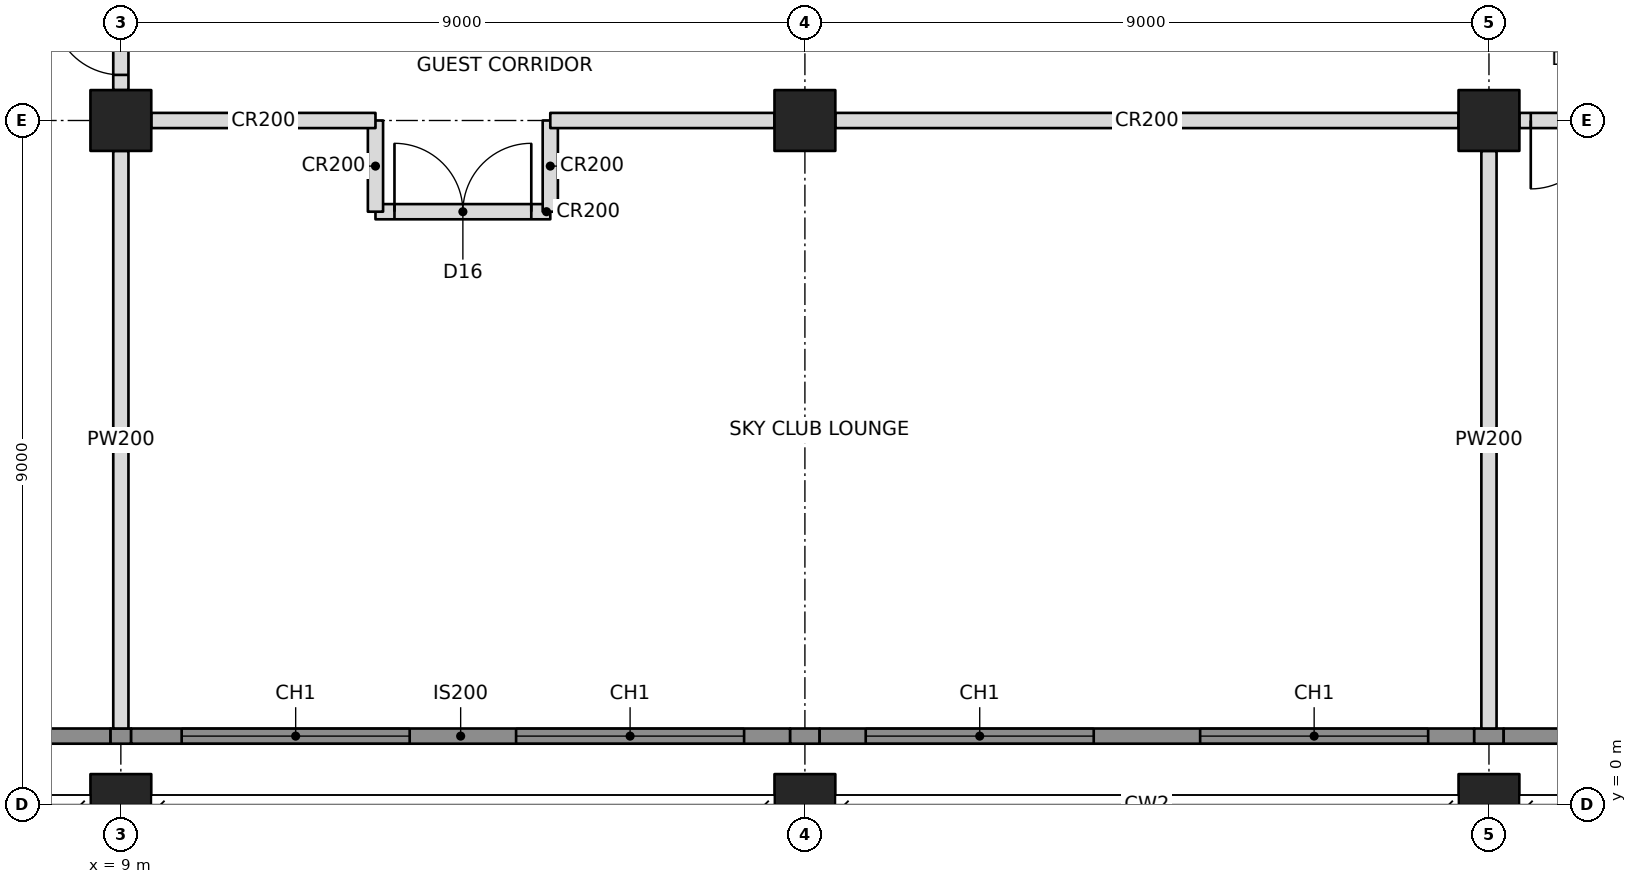
"""IFC4 building model, lengths in metres.
Left out: names, types, materials, properties, quantities, classifications, styles, units other than length and angle.
Written with IfcOpenShell. Run it as: python <this file> out.ifc"""

import sys

from ifc_helpers import new_model, si_unit, direction, frame, frame_2d, origin, origin_2d, place, context, subcontext, project, spatial, rectangle, hollow_rectangle, extrude, element, fill, save


model = new_model("IFC4")
c1 = context("Model", 3, precision=1e-05, world=origin(), true_north=direction((0.0, 1.0)))
c2 = subcontext(c1, "Body", "Model", "MODEL_VIEW")
j1 = project(units=[si_unit("LENGTHUNIT", "METRE"), si_unit("PLANEANGLEUNIT", "RADIAN")], contexts=[c1])
p1 = place(None, origin())
s1 = spatial("IfcSite", under=j1, at=p1, CompositionType="ELEMENT")
p2 = place(p1, origin())
s2 = spatial("IfcBuilding", under=s1, at=p2, CompositionType="ELEMENT")
p3 = place(p2, frame((0.0, 0.0, 226.6)))
s3 = spatial("IfcBuildingStorey", under=s2, at=p3, CompositionType="ELEMENT", Elevation=226.6)
p4 = place(p3, frame((9.0, 0.0, 0.0), z_axis=(0.0, 0.0, 1.0), x_axis=(1.0, 0.0, 0.0)))
e1 = element("IfcColumn", 1, at=p4, inside=s3, PredefinedType="COLUMN", context=c2, shape_type="SweptSolid", body=[
    extrude(hollow_rectangle(XDim=0.8, YDim=0.8, WallThickness=0.05, at=origin_2d()), origin(), (0.0, 0.0, 1.0), 3.6),
])
p5 = place(p3, frame((9.0, 9.0, 0.0), z_axis=(0.0, 0.0, 1.0), x_axis=(1.0, 0.0, 0.0)))
e2 = element("IfcColumn", 2, at=p5, inside=s3, PredefinedType="COLUMN", context=c2, shape_type="SweptSolid", body=[
    extrude(hollow_rectangle(XDim=0.8, YDim=0.8, WallThickness=0.1, at=origin_2d()), origin(), (0.0, 0.0, 1.0), 3.6),
])
p6 = place(p3, frame((18.0, 0.0, 0.0), z_axis=(0.0, 0.0, 1.0), x_axis=(1.0, 0.0, 0.0)))
e3 = element("IfcColumn", 3, at=p6, inside=s3, PredefinedType="COLUMN", context=c2, shape_type="SweptSolid", body=[
    extrude(hollow_rectangle(XDim=0.8, YDim=0.8, WallThickness=0.05, at=origin_2d()), origin(), (0.0, 0.0, 1.0), 3.6),
])
p7 = place(p3, frame((18.0, 9.0, 0.0), z_axis=(0.0, 0.0, 1.0), x_axis=(1.0, 0.0, 0.0)))
e4 = element("IfcColumn", 4, at=p7, inside=s3, PredefinedType="COLUMN", context=c2, shape_type="SweptSolid", body=[
    extrude(hollow_rectangle(XDim=0.8, YDim=0.8, WallThickness=0.1, at=origin_2d()), origin(), (0.0, 0.0, 1.0), 3.6),
])
p8 = place(p3, frame((27.0, 0.0, 0.0), z_axis=(0.0, 0.0, 1.0), x_axis=(1.0, 0.0, 0.0)))
e5 = element("IfcColumn", 5, at=p8, inside=s3, PredefinedType="COLUMN", context=c2, shape_type="SweptSolid", body=[
    extrude(hollow_rectangle(XDim=0.8, YDim=0.8, WallThickness=0.05, at=origin_2d()), origin(), (0.0, 0.0, 1.0), 3.6),
])
p9 = place(p3, frame((27.0, 9.0, 0.0), z_axis=(0.0, 0.0, 1.0), x_axis=(1.0, 0.0, 0.0)))
e6 = element("IfcColumn", 6, at=p9, inside=s3, PredefinedType="COLUMN", context=c2, shape_type="SweptSolid", body=[
    extrude(hollow_rectangle(XDim=0.8, YDim=0.8, WallThickness=0.1, at=origin_2d()), origin(), (0.0, 0.0, 1.0), 3.6),
])
p10 = place(p3, frame((3.0, 0.9, 0.0), z_axis=(0.0, 0.0, 1.0), x_axis=(1.0, 0.0, 0.0)))
e7 = element("IfcWall", 7, at=p10, inside=s3, PredefinedType="SOLIDWALL", context=c2, shape_type="SweptSolid", body=[
    extrude(rectangle(XDim=5.865, YDim=0.2, at=frame_2d((2.932, 0.0))), origin(), (0.0, 0.0, 1.0), 3.4),
])
p11 = place(p10, frame((1.45, 0.0, 0.6)))
e8 = element("IfcOpeningElement", 8, at=p11, cuts=e7, PredefinedType="OPENING", context=c2, shape_type="SweptSolid", body=[
    extrude(rectangle(XDim=3.0, YDim=2.2, at=frame_2d((1.5, 1.1))), frame((0.0, 0.11, 0.0), z_axis=(0.0, -1.0, 0.0), x_axis=(1.0, 0.0, 0.0)), (0.0, 0.0, 1.0), 0.22),
])
p12 = place(p3, frame((9.4, 9.0, 0.0), z_axis=(0.0, 0.0, 1.0), x_axis=(1.0, 0.0, 0.0)))
e9 = element("IfcWall", 9, at=p12, inside=s3, PredefinedType="PARTITIONING", context=c2, shape_type="SweptSolid", body=[
    extrude(rectangle(XDim=2.95, YDim=0.2, at=frame_2d((1.475, 0.0))), origin(), (0.0, 0.0, 1.0), 2.605),
])
p13 = place(p3, frame((18.4, 9.0, 0.0), z_axis=(0.0, 0.0, 1.0), x_axis=(1.0, 0.0, 0.0)))
e10 = element("IfcWall", 10, at=p13, inside=s3, PredefinedType="PARTITIONING", context=c2, shape_type="SweptSolid", body=[
    extrude(rectangle(XDim=8.2, YDim=0.2, at=frame_2d((4.1, 0.0))), origin(), (0.0, 0.0, 1.0), 2.605),
])
p14 = place(p3, frame((27.4, 9.0, 0.0), z_axis=(0.0, 0.0, 1.0), x_axis=(1.0, 0.0, 0.0)))
e11 = element("IfcWall", 11, at=p14, inside=s3, PredefinedType="PARTITIONING", context=c2, shape_type="SweptSolid", body=[
    extrude(rectangle(XDim=8.368, YDim=0.2, at=frame_2d((4.184, 0.0))), origin(), (0.0, 0.0, 1.0), 2.605),
])
p15 = place(p14, frame((6.825, 0.0, 0.0)))
e12 = element("IfcOpeningElement", 12, at=p15, cuts=e11, PredefinedType="OPENING", context=c2, shape_type="SweptSolid", body=[
    extrude(rectangle(XDim=1.0, YDim=2.1, at=frame_2d((0.5, 1.05))), frame((0.0, 0.11, 0.0), z_axis=(0.0, -1.0, 0.0), x_axis=(1.0, 0.0, 0.0)), (0.0, 0.0, 1.0), 0.22),
])
p16 = place(p14, frame((0.15, 0.0, 0.0)))
e13 = element("IfcOpeningElement", 13, at=p16, cuts=e11, PredefinedType="OPENING", context=c2, shape_type="SweptSolid", body=[
    extrude(rectangle(XDim=0.9, YDim=2.1, at=frame_2d((0.45, 1.05))), frame((0.0, 0.11, 0.0), z_axis=(0.0, -1.0, 0.0), x_axis=(1.0, 0.0, 0.0)), (0.0, 0.0, 1.0), 0.22),
])
p17 = place(p3, frame((9.0, 8.6, 0.0), z_axis=(0.0, 0.0, 1.0), x_axis=(0.0, -1.0, 0.0)))
e14 = element("IfcWall", 14, at=p17, inside=s3, PredefinedType="PARTITIONING", context=c2, shape_type="SweptSolid", body=[
    extrude(rectangle(XDim=7.6, YDim=0.2, at=frame_2d((3.8, 0.0))), origin(), (0.0, 0.0, 1.0), 2.638),
])
p18 = place(p3, frame((27.0, 8.6, 0.0), z_axis=(0.0, 0.0, 1.0), x_axis=(0.0, -1.0, 0.0)))
e15 = element("IfcWall", 15, at=p18, inside=s3, PredefinedType="PARTITIONING", context=c2, shape_type="SweptSolid", body=[
    extrude(rectangle(XDim=7.6, YDim=0.2, at=frame_2d((3.8, 0.0))), origin(), (0.0, 0.0, 1.0), 2.605),
])
p19 = place(p3, frame((14.65, 9.0, 0.0), z_axis=(0.0, 0.0, 1.0), x_axis=(1.0, 0.0, 0.0)))
e16 = element("IfcWall", 16, at=p19, inside=s3, PredefinedType="PARTITIONING", context=c2, shape_type="SweptSolid", body=[
    extrude(rectangle(XDim=2.95, YDim=0.2, at=frame_2d((1.475, 0.0))), origin(), (0.0, 0.0, 1.0), 2.605),
])
for number, where, z_axis, x_axis in (
    (17, (12.35, 9.0, 0.0), (0.0, 0.0, 1.0), (0.0, -1.0, 0.0)),
    (18, (14.65, 9.0, 0.0), (0.0, 0.0, 1.0), (0.0, -1.0, 0.0)),
):
    element("IfcWall", number, at=place(p3, frame(where, z_axis=z_axis, x_axis=x_axis)), inside=s3, PredefinedType="PARTITIONING", context=c2, shape_type="SweptSolid", body=[
        extrude(rectangle(XDim=1.2, YDim=0.2, at=frame_2d((0.6, 0.0))), origin(), (0.0, 0.0, 1.0), 2.604),
    ])
p20 = place(p3, frame((12.35, 7.8, 0.0), z_axis=(0.0, 0.0, 1.0), x_axis=(1.0, 0.0, 0.0)))
e19 = element("IfcWall", 19, at=p20, inside=s3, PredefinedType="PARTITIONING", context=c2, shape_type="SweptSolid", body=[
    extrude(rectangle(XDim=2.3, YDim=0.2, at=frame_2d((1.15, 0.0))), origin(), (0.0, 0.0, 1.0), 3.4),
])
p21 = place(p20, frame((0.25, 0.0, 0.0)))
e20 = element("IfcOpeningElement", 20, at=p21, cuts=e19, PredefinedType="OPENING", context=c2, shape_type="SweptSolid", body=[
    extrude(rectangle(XDim=1.8, YDim=2.4, at=frame_2d((0.9, 1.2))), frame((0.0, 0.11, 0.0), z_axis=(0.0, -1.0, 0.0), x_axis=(1.0, 0.0, 0.0)), (0.0, 0.0, 1.0), 0.22),
])
p22 = place(p3, frame((9.0, 9.4, 0.0), z_axis=(0.0, 0.0, 1.0), x_axis=(0.0, 1.0, 0.0)))
e21 = element("IfcWall", 21, at=p22, inside=s3, PredefinedType="PARTITIONING", context=c2, shape_type="SweptSolid", body=[
    extrude(rectangle(XDim=1.3, YDim=0.2, at=frame_2d((0.65, 0.0))), origin(), (0.0, 0.0, 1.0), 2.605),
])
p23 = place(p22, frame((0.2, 0.0, 0.0)))
e22 = element("IfcOpeningElement", 22, at=p23, cuts=e21, PredefinedType="OPENING", context=c2, shape_type="SweptSolid", body=[
    extrude(rectangle(XDim=0.9, YDim=2.1, at=frame_2d((0.45, 1.05))), frame((0.0, 0.11, 0.0), z_axis=(0.0, -1.0, 0.0), x_axis=(1.0, 0.0, 0.0)), (0.0, 0.0, 1.0), 0.22),
])
p24 = place(p3, frame((8.865, 0.9, 0.0), z_axis=(0.0, 0.0, 1.0), x_axis=(1.0, 0.0, 0.0)))
e23 = element("IfcWall", 23, at=p24, inside=s3, PredefinedType="SOLIDWALL", context=c2, shape_type="SweptSolid", body=[
    extrude(rectangle(XDim=0.271, YDim=0.2, at=frame_2d((0.135, 0.0))), origin(), (0.0, 0.0, 1.0), 2.638),
])
p25 = place(p3, frame((9.135, 0.9, 0.0), z_axis=(0.0, 0.0, 1.0), x_axis=(1.0, 0.0, 0.0)))
e24 = element("IfcWall", 24, at=p25, inside=s3, PredefinedType="SOLIDWALL", context=c2, shape_type="SweptSolid", body=[
    extrude(rectangle(XDim=8.671, YDim=0.2, at=frame_2d((4.335, 0.0))), origin(), (0.0, 0.0, 1.0), 3.4),
])
p26 = place(p25, frame((0.665, 0.0, 0.6)))
e25 = element("IfcOpeningElement", 25, at=p26, cuts=e24, PredefinedType="OPENING", context=c2, shape_type="SweptSolid", body=[
    extrude(rectangle(XDim=3.0, YDim=2.2, at=frame_2d((1.5, 1.1))), frame((0.0, 0.11, 0.0), z_axis=(0.0, -1.0, 0.0), x_axis=(1.0, 0.0, 0.0)), (0.0, 0.0, 1.0), 0.22),
])
p27 = place(p25, frame((5.065, 0.0, 0.6)))
e26 = element("IfcOpeningElement", 26, at=p27, cuts=e24, PredefinedType="OPENING", context=c2, shape_type="SweptSolid", body=[
    extrude(rectangle(XDim=3.0, YDim=2.2, at=frame_2d((1.5, 1.1))), frame((0.0, 0.11, 0.0), z_axis=(0.0, -1.0, 0.0), x_axis=(1.0, 0.0, 0.0)), (0.0, 0.0, 1.0), 0.22),
])
p28 = place(p3, frame((17.806, 0.9, 0.0), z_axis=(0.0, 0.0, 1.0), x_axis=(1.0, 0.0, 0.0)))
e27 = element("IfcWall", 27, at=p28, inside=s3, PredefinedType="SOLIDWALL", context=c2, shape_type="SweptSolid", body=[
    extrude(rectangle(XDim=0.388, YDim=0.2, at=frame_2d((0.194, 0.0))), origin(), (0.0, 0.0, 1.0), 2.604),
])
p29 = place(p3, frame((18.194, 0.9, 0.0), z_axis=(0.0, 0.0, 1.0), x_axis=(1.0, 0.0, 0.0)))
e28 = element("IfcWall", 28, at=p29, inside=s3, PredefinedType="SOLIDWALL", context=c2, shape_type="SweptSolid", body=[
    extrude(rectangle(XDim=8.612, YDim=0.2, at=frame_2d((4.306, 0.0))), origin(), (0.0, 0.0, 1.0), 3.4),
])
p30 = place(p29, frame((0.606, 0.0, 0.6)))
e29 = element("IfcOpeningElement", 29, at=p30, cuts=e28, PredefinedType="OPENING", context=c2, shape_type="SweptSolid", body=[
    extrude(rectangle(XDim=3.0, YDim=2.2, at=frame_2d((1.5, 1.1))), frame((0.0, 0.11, 0.0), z_axis=(0.0, -1.0, 0.0), x_axis=(1.0, 0.0, 0.0)), (0.0, 0.0, 1.0), 0.22),
])
p31 = place(p29, frame((5.006, 0.0, 0.6)))
e30 = element("IfcOpeningElement", 30, at=p31, cuts=e28, PredefinedType="OPENING", context=c2, shape_type="SweptSolid", body=[
    extrude(rectangle(XDim=3.0, YDim=2.2, at=frame_2d((1.5, 1.1))), frame((0.0, 0.11, 0.0), z_axis=(0.0, -1.0, 0.0), x_axis=(1.0, 0.0, 0.0)), (0.0, 0.0, 1.0), 0.22),
])
p32 = place(p3, frame((26.806, 0.9, 0.0), z_axis=(0.0, 0.0, 1.0), x_axis=(1.0, 0.0, 0.0)))
e31 = element("IfcWall", 31, at=p32, inside=s3, PredefinedType="SOLIDWALL", context=c2, shape_type="SweptSolid", body=[
    extrude(rectangle(XDim=0.388, YDim=0.2, at=frame_2d((0.194, 0.0))), origin(), (0.0, 0.0, 1.0), 2.604),
])
p33 = place(p3, frame((27.194, 0.9, 0.0), z_axis=(0.0, 0.0, 1.0), x_axis=(1.0, 0.0, 0.0)))
e32 = element("IfcWall", 32, at=p33, inside=s3, PredefinedType="SOLIDWALL", context=c2, shape_type="SweptSolid", body=[
    extrude(rectangle(XDim=5.806, YDim=0.2, at=frame_2d((2.903, 0.0))), origin(), (0.0, 0.0, 1.0), 3.4),
])
p34 = place(p33, frame((1.356, 0.0, 0.6)))
e33 = element("IfcOpeningElement", 33, at=p34, cuts=e32, PredefinedType="OPENING", context=c2, shape_type="SweptSolid", body=[
    extrude(rectangle(XDim=3.0, YDim=2.2, at=frame_2d((1.5, 1.1))), frame((0.0, 0.11, 0.0), z_axis=(0.0, -1.0, 0.0), x_axis=(1.0, 0.0, 0.0)), (0.0, 0.0, 1.0), 0.22),
])
p35 = place(p26, origin())
e34 = element("IfcWindow", 34, at=p35, inside=s3, PartitioningType="TRIPLE_PANEL_VERTICAL", PredefinedType="WINDOW", context=c2, shape_type="SweptSolid", body=[
    extrude(rectangle(XDim=3.0, YDim=2.2, at=frame_2d((1.5, 1.1))), frame((0.0, 0.03, 0.0), z_axis=(0.0, -1.0, 0.0), x_axis=(1.0, 0.0, 0.0)), (0.0, 0.0, 1.0), 0.06),
])
fill(e25, e34)
p36 = place(p27, origin())
e35 = element("IfcWindow", 35, at=p36, inside=s3, PartitioningType="TRIPLE_PANEL_VERTICAL", PredefinedType="WINDOW", context=c2, shape_type="SweptSolid", body=[
    extrude(rectangle(XDim=3.0, YDim=2.2, at=frame_2d((1.5, 1.1))), frame((0.0, 0.03, 0.0), z_axis=(0.0, -1.0, 0.0), x_axis=(1.0, 0.0, 0.0)), (0.0, 0.0, 1.0), 0.06),
])
fill(e26, e35)
p37 = place(p30, origin())
e36 = element("IfcWindow", 36, at=p37, inside=s3, PartitioningType="TRIPLE_PANEL_VERTICAL", PredefinedType="WINDOW", context=c2, shape_type="SweptSolid", body=[
    extrude(rectangle(XDim=3.0, YDim=2.2, at=frame_2d((1.5, 1.1))), frame((0.0, 0.03, 0.0), z_axis=(0.0, -1.0, 0.0), x_axis=(1.0, 0.0, 0.0)), (0.0, 0.0, 1.0), 0.06),
])
fill(e29, e36)
p38 = place(p31, origin())
e37 = element("IfcWindow", 37, at=p38, inside=s3, PartitioningType="TRIPLE_PANEL_VERTICAL", PredefinedType="WINDOW", context=c2, shape_type="SweptSolid", body=[
    extrude(rectangle(XDim=3.0, YDim=2.2, at=frame_2d((1.5, 1.1))), frame((0.0, 0.03, 0.0), z_axis=(0.0, -1.0, 0.0), x_axis=(1.0, 0.0, 0.0)), (0.0, 0.0, 1.0), 0.06),
])
fill(e30, e37)
p39 = place(p21, origin())
e38 = element("IfcDoor", 38, at=p39, inside=s3, OperationType="DOUBLE_DOOR_SINGLE_SWING", PredefinedType="DOOR", context=c2, shape_type="SweptSolid", body=[
    extrude(rectangle(XDim=1.8, YDim=2.4, at=frame_2d((0.9, 1.2))), frame((0.0, 0.025, 0.0), z_axis=(0.0, -1.0, 0.0), x_axis=(1.0, 0.0, 0.0)), (0.0, 0.0, 1.0), 0.05),
])
fill(e20, e38)
p40 = place(p16, frame((0.9, 0.0, 0.0), z_axis=(0.0, 0.0, 1.0), x_axis=(-1.0, 0.0, 0.0)))
e39 = element("IfcDoor", 39, at=p40, inside=s3, OperationType="SINGLE_SWING_RIGHT", PredefinedType="DOOR", context=c2, shape_type="SweptSolid", body=[
    extrude(rectangle(XDim=0.9, YDim=2.1, at=frame_2d((0.45, 1.05))), frame((0.0, 0.025, 0.0), z_axis=(0.0, -1.0, 0.0), x_axis=(1.0, 0.0, 0.0)), (0.0, 0.0, 1.0), 0.05),
])
fill(e13, e39)
p41 = place(p23, origin())
e40 = element("IfcDoor", 40, at=p41, inside=s3, OperationType="SINGLE_SWING_RIGHT", PredefinedType="DOOR", context=c2, shape_type="SweptSolid", body=[
    extrude(rectangle(XDim=0.9, YDim=2.1, at=frame_2d((0.45, 1.05))), frame((0.0, 0.025, 0.0), z_axis=(0.0, -1.0, 0.0), x_axis=(1.0, 0.0, 0.0)), (0.0, 0.0, 1.0), 0.05),
])
fill(e22, e40)
save(model, sys.argv[1])
